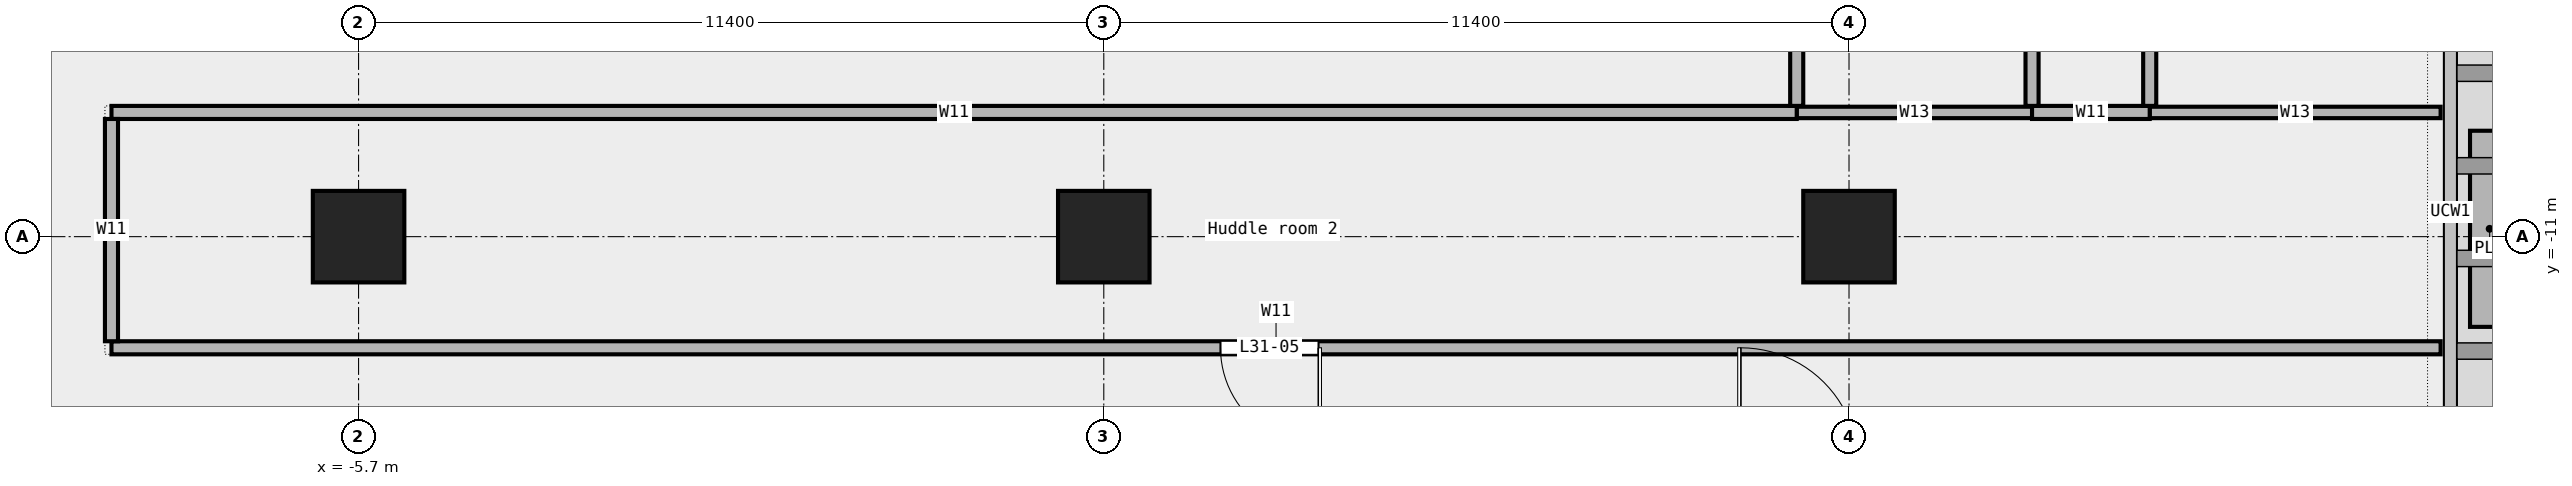
"""IFC4 building model, lengths in metres.
Left out: names, types, materials, properties, quantities, classifications, styles, units other than length and angle.
Written with IfcOpenShell. Run it as: python <this file> out.ifc"""

import sys

from ifc_helpers import new_model, si_unit, direction, frame, frame_2d, origin, origin_2d, place, context, subcontext, project, spatial, rectangle, extrude, element, fill, save


model = new_model("IFC4")
c1 = context("Model", 3, precision=1e-05, world=origin(), true_north=direction((0.0, 1.0)))
c2 = subcontext(c1, "Body", "Model", "MODEL_VIEW")
j1 = project(units=[si_unit("LENGTHUNIT", "METRE"), si_unit("PLANEANGLEUNIT", "RADIAN")], contexts=[c1])
p1 = place(None, origin())
s1 = spatial("IfcSite", under=j1, at=p1, CompositionType="ELEMENT")
p2 = place(p1, origin())
s2 = spatial("IfcBuilding", under=s1, at=p2, CompositionType="ELEMENT")
p3 = place(p2, frame((0.0, 0.0, 157.0)))
s3 = spatial("IfcBuildingStorey", under=s2, at=p3, CompositionType="ELEMENT", Elevation=157.0)
for number, where, z_axis, x_axis in (
    (1, (-5.7, -11.0, 0.0), (0.0, 0.0, 1.0), (1.0, 0.0, 0.0)),
    (2, (5.7, -11.0, 0.0), (0.0, 0.0, 1.0), (1.0, 0.0, 0.0)),
    (3, (17.1, -11.0, 0.0), (0.0, 0.0, 1.0), (1.0, 0.0, 0.0)),
):
    element("IfcColumn", number, at=place(p3, frame(where, z_axis=z_axis, x_axis=x_axis)), inside=s3, PredefinedType="COLUMN", context=c2, shape_type="SweptSolid", body=[
        extrude(rectangle(XDim=1.4, YDim=1.4, at=origin_2d()), origin(), (0.0, 0.0, 1.0), 3.6),
    ])
p4 = place(p3, frame((26.9, -12.38, 0.0), z_axis=(0.0, 0.0, 1.0), x_axis=(0.0, 1.0, 0.0)))
e4 = element("IfcWall", 4, at=p4, inside=s3, PredefinedType="STANDARD", context=c2, shape_type="SweptSolid", body=[
    extrude(rectangle(XDim=3.0, YDim=0.6, at=frame_2d((1.5, 0.0))), origin(), (0.0, 0.0, 1.0), 0.7),
])
p5 = place(p3, frame((-9.48, -12.7, 0.0), z_axis=(0.0, 0.0, 1.0), x_axis=(1.0, 0.0, 0.0)))
e5 = element("IfcWall", 5, at=p5, inside=s3, PredefinedType="PARTITIONING", context=c2, shape_type="SweptSolid", body=[
    extrude(rectangle(XDim=35.63, YDim=0.2, at=frame_2d((17.815, 0.0))), origin(), (0.0, 0.0, 1.0), 3.6),
])
p6 = place(p5, frame((16.965, 0.0, 0.0)))
e6 = element("IfcOpeningElement", 6, at=p6, cuts=e5, PredefinedType="OPENING", context=c2, shape_type="SweptSolid", body=[
    extrude(rectangle(XDim=1.5, YDim=2.1, at=frame_2d((0.75, 1.05))), frame((0.0, 0.112, 0.0), z_axis=(0.0, -1.0, 0.0), x_axis=(1.0, 0.0, 0.0)), (0.0, 0.0, 1.0), 0.224),
])
p7 = place(p3, frame((16.3, -9.1, 0.0), z_axis=(0.0, 0.0, 1.0), x_axis=(1.0, 0.0, 0.0)))
e7 = element("IfcWall", 7, at=p7, inside=s3, PredefinedType="PARTITIONING", context=c2, shape_type="SweptSolid", body=[
    extrude(rectangle(XDim=3.6, YDim=0.175, at=frame_2d((1.8, 0.0))), origin(), (0.0, 0.0, 1.0), 3.6),
])
p8 = place(p3, frame((21.7, -9.1, 0.0), z_axis=(0.0, 0.0, 1.0), x_axis=(1.0, 0.0, 0.0)))
e8 = element("IfcWall", 8, at=p8, inside=s3, PredefinedType="PARTITIONING", context=c2, shape_type="SweptSolid", body=[
    extrude(rectangle(XDim=4.45, YDim=0.175, at=frame_2d((2.225, 0.0))), origin(), (0.0, 0.0, 1.0), 3.6),
])
p9 = place(p3, frame((-9.48, -9.1, 0.0), z_axis=(0.0, 0.0, 1.0), x_axis=(1.0, 0.0, 0.0)))
e9 = element("IfcWall", 9, at=p9, inside=s3, PredefinedType="PARTITIONING", context=c2, shape_type="SweptSolid", body=[
    extrude(rectangle(XDim=25.78, YDim=0.2, at=frame_2d((12.89, 0.0))), origin(), (0.0, 0.0, 1.0), 3.6),
])
p10 = place(p3, frame((19.9, -9.1, 0.0), z_axis=(0.0, 0.0, 1.0), x_axis=(1.0, 0.0, 0.0)))
e10 = element("IfcWall", 10, at=p10, inside=s3, PredefinedType="PARTITIONING", context=c2, shape_type="SweptSolid", body=[
    extrude(rectangle(XDim=1.8, YDim=0.2, at=frame_2d((0.9, 0.0))), origin(), (0.0, 0.0, 1.0), 3.6),
])
p11 = place(p3, frame((-9.48, -12.6, 0.0), z_axis=(0.0, 0.0, 1.0), x_axis=(0.0, 1.0, 0.0)))
e11 = element("IfcWall", 11, at=p11, inside=s3, PredefinedType="PARTITIONING", context=c2, shape_type="SweptSolid", body=[
    extrude(rectangle(XDim=3.4, YDim=0.2, at=frame_2d((1.7, 0.0))), origin(), (0.0, 0.0, 1.0), 3.6),
])
p12 = place(p3, frame((16.3, -9.0, 0.0), z_axis=(0.0, 0.0, 1.0), x_axis=(0.0, 1.0, 0.0)))
e12 = element("IfcWall", 12, at=p12, inside=s3, PredefinedType="PARTITIONING", context=c2, shape_type="SweptSolid", body=[
    extrude(rectangle(XDim=8.3, YDim=0.2, at=frame_2d((4.15, 0.0))), origin(), (0.0, 0.0, 1.0), 3.6),
])
p13 = place(p3, frame((19.9, -9.0, 0.0), z_axis=(0.0, 0.0, 1.0), x_axis=(0.0, 1.0, 0.0)))
e13 = element("IfcWall", 13, at=p13, inside=s3, PredefinedType="PARTITIONING", context=c2, shape_type="SweptSolid", body=[
    extrude(rectangle(XDim=13.6, YDim=0.2, at=frame_2d((6.8, 0.0))), origin(), (0.0, 0.0, 1.0), 3.6),
])
p14 = place(p13, frame((3.442, 0.0, 0.0)))
e14 = element("IfcOpeningElement", 14, at=p14, cuts=e13, PredefinedType="OPENING", context=c2, shape_type="SweptSolid", body=[
    extrude(rectangle(XDim=0.9, YDim=2.1, at=frame_2d((0.45, 1.05))), frame((0.0, 0.112, 0.0), z_axis=(0.0, -1.0, 0.0), x_axis=(1.0, 0.0, 0.0)), (0.0, 0.0, 1.0), 0.224),
])
p15 = place(p13, frame((10.242, 0.0, 0.0)))
e15 = element("IfcOpeningElement", 15, at=p15, cuts=e13, PredefinedType="OPENING", context=c2, shape_type="SweptSolid", body=[
    extrude(rectangle(XDim=0.9, YDim=2.1, at=frame_2d((0.45, 1.05))), frame((0.0, 0.112, 0.0), z_axis=(0.0, -1.0, 0.0), x_axis=(1.0, 0.0, 0.0)), (0.0, 0.0, 1.0), 0.224),
])
p16 = place(p3, frame((21.7, -9.0, 0.0), z_axis=(0.0, 0.0, 1.0), x_axis=(0.0, 1.0, 0.0)))
e16 = element("IfcWall", 16, at=p16, inside=s3, PredefinedType="PARTITIONING", context=c2, shape_type="SweptSolid", body=[
    extrude(rectangle(XDim=24.3, YDim=0.2, at=frame_2d((12.15, 0.0))), origin(), (0.0, 0.0, 1.0), 3.6),
])
p17 = place(p16, frame((14.925, 0.0, 0.0)))
e17 = element("IfcOpeningElement", 17, at=p17, cuts=e16, PredefinedType="OPENING", context=c2, shape_type="SweptSolid", body=[
    extrude(rectangle(XDim=0.9, YDim=2.1, at=frame_2d((0.45, 1.05))), frame((0.0, 0.112, 0.0), z_axis=(0.0, -1.0, 0.0), x_axis=(1.0, 0.0, 0.0)), (0.0, 0.0, 1.0), 0.224),
])
p18 = place(p16, frame((2.562, 0.0, 0.0)))
e18 = element("IfcOpeningElement", 18, at=p18, cuts=e16, PredefinedType="OPENING", context=c2, shape_type="SweptSolid", body=[
    extrude(rectangle(XDim=0.9, YDim=2.1, at=frame_2d((0.45, 1.05))), frame((0.0, 0.112, 0.0), z_axis=(0.0, -1.0, 0.0), x_axis=(1.0, 0.0, 0.0)), (0.0, 0.0, 1.0), 0.224),
])
p19 = place(p6, origin())
e19 = element("IfcDoor", 19, at=p19, inside=s3, OperationType="DOUBLE_DOOR_SINGLE_SWING", PredefinedType="DOOR", context=c2, shape_type="SweptSolid", body=[
    extrude(rectangle(XDim=1.5, YDim=2.1, at=frame_2d((0.75, 1.05))), frame((0.0, 0.025, 0.0), z_axis=(0.0, -1.0, 0.0), x_axis=(1.0, 0.0, 0.0)), (0.0, 0.0, 1.0), 0.05),
])
fill(e6, e19)
save(model, sys.argv[1])
